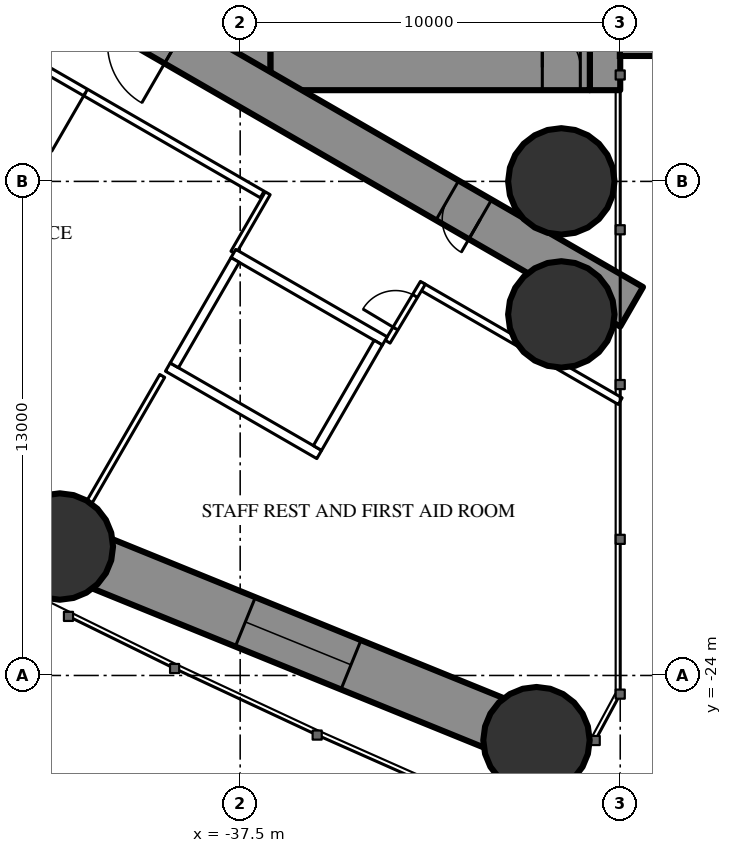
"""IFC4 building model, lengths in metres.
Left out: names, types, materials, properties, quantities, classifications, styles, units other than length and angle.
Written with IfcOpenShell. Run it as: python <this file> out.ifc"""

import sys

from ifc_helpers import new_model, si_unit, direction, frame, frame_2d, origin, origin_2d, place, context, subcontext, project, spatial, rectangle, hollow_circle, extrude, element, fill, save


model = new_model("IFC4")
c1 = context("Model", 3, precision=1e-05, world=origin(), true_north=direction((0.0, 1.0)))
c2 = subcontext(c1, "Body", "Model", "MODEL_VIEW")
j1 = project(units=[si_unit("LENGTHUNIT", "METRE"), si_unit("PLANEANGLEUNIT", "RADIAN")], contexts=[c1])
p1 = place(None, origin())
s1 = spatial("IfcSite", under=j1, at=p1, CompositionType="ELEMENT")
p2 = place(p1, origin())
s2 = spatial("IfcBuilding", under=s1, at=p2, CompositionType="ELEMENT")
p3 = place(p2, frame((0.0, 0.0, 77.5)))
s3 = spatial("IfcBuildingStorey", under=s2, at=p3, CompositionType="ELEMENT", Elevation=77.5)
for number, where, z_axis, x_axis in (
    (1, (-29.703, -25.703, 0.0), (0.0, 0.0, 1.0), (1.0, 0.0, 0.0)),
    (2, (-29.05, -11.0, 0.0), (0.0, 0.0, 1.0), (1.0, 0.0, 0.0)),
    (3, (-29.05, -14.5, 0.0), (0.0, 0.0, 1.0), (1.0, 0.0, 0.0)),
    (4, (-42.245, -20.607, 0.0), (0.0, 0.0, 1.0), (1.0, 0.0, 0.0)),
):
    element("IfcColumn", number, at=place(p3, frame(where, z_axis=z_axis, x_axis=x_axis)), inside=s3, PredefinedType="COLUMN", context=c2, shape_type="SweptSolid", body=[
        extrude(hollow_circle(Radius=1.4, WallThickness=0.12, at=origin_2d()), origin(), (0.0, 0.0, 1.0), 3.5),
    ])
p4 = place(p3, frame((-27.9, 8.6, 0.0), z_axis=(0.0, 0.0, 1.0), x_axis=(0.0, -1.0, 0.0)))
e5 = element("IfcWall", 5, at=p4, inside=s3, PredefinedType="SHEAR", context=c2, shape_type="SweptSolid", body=[
    extrude(rectangle(XDim=17.2, YDim=0.8, at=frame_2d((8.6, 0.0))), origin(), (0.0, 0.0, 1.0), 3.5),
])
p5 = place(p4, frame((2.45, 0.0, 0.6)))
e6 = element("IfcOpeningElement", 6, at=p5, cuts=e5, PredefinedType="OPENING", context=c2, shape_type="SweptSolid", body=[
    extrude(rectangle(XDim=0.6, YDim=2.1, at=frame_2d((0.3, 1.05))), frame((0.0, 0.41, 0.0), z_axis=(0.0, -1.0, 0.0), x_axis=(1.0, 0.0, 0.0)), (0.0, 0.0, 1.0), 0.82),
])
p6 = place(p4, frame((14.15, 0.0, 0.6)))
e7 = element("IfcOpeningElement", 7, at=p6, cuts=e5, PredefinedType="OPENING", context=c2, shape_type="SweptSolid", body=[
    extrude(rectangle(XDim=0.6, YDim=2.1, at=frame_2d((0.3, 1.05))), frame((0.0, 0.41, 0.0), z_axis=(0.0, -1.0, 0.0), x_axis=(1.0, 0.0, 0.0)), (0.0, 0.0, 1.0), 0.82),
])
p7 = place(p3, frame((-37.3, 8.6, 0.0), z_axis=(0.0, 0.0, 1.0), x_axis=(0.0, -1.0, 0.0)))
e8 = element("IfcWall", 8, at=p7, inside=s3, PredefinedType="SHEAR", context=c2, shape_type="SweptSolid", body=[
    extrude(rectangle(XDim=17.2, YDim=1.2, at=frame_2d((8.6, 0.0))), origin(), (0.0, 0.0, 1.0), 3.5),
])
p8 = place(p7, frame((7.7, 0.0, 0.0)))
e9 = element("IfcOpeningElement", 9, at=p8, cuts=e8, PredefinedType="OPENING", context=c2, shape_type="SweptSolid", body=[
    extrude(rectangle(XDim=1.8, YDim=2.2, at=frame_2d((0.9, 1.1))), frame((0.0, 0.61, 0.0), z_axis=(0.0, -1.0, 0.0), x_axis=(1.0, 0.0, 0.0)), (0.0, 0.0, 1.0), 1.22),
])
p9 = place(p3, frame((-28.3, -8.0, 0.0), z_axis=(0.0, 0.0, 1.0), x_axis=(-1.0, 0.0, 0.0)))
e10 = element("IfcWall", 10, at=p9, inside=s3, PredefinedType="SHEAR", context=c2, shape_type="SweptSolid", body=[
    extrude(rectangle(XDim=8.4, YDim=1.2, at=frame_2d((4.2, 0.0))), origin(), (0.0, 0.0, 1.0), 3.5),
])
p10 = place(p9, frame((0.25, 0.0, 0.0)))
e11 = element("IfcOpeningElement", 11, at=p10, cuts=e10, PredefinedType="OPENING", context=c2, shape_type="SweptSolid", body=[
    extrude(rectangle(XDim=1.0, YDim=2.2, at=frame_2d((0.5, 1.1))), frame((0.0, 0.61, 0.0), z_axis=(0.0, -1.0, 0.0), x_axis=(1.0, 0.0, 0.0)), (0.0, 0.0, 1.0), 1.22),
])
p11 = place(p3, frame((-27.2, -14.3, 0.0), z_axis=(0.0, 0.0, 1.0), x_axis=(-0.866024021859, 0.500002393557, 0.0)))
e12 = element("IfcWall", 12, at=p11, inside=s3, PredefinedType="SHEAR", context=c2, shape_type="SweptSolid", body=[
    extrude(rectangle(XDim=27.907, YDim=1.2, at=frame_2d((13.954, 0.0))), origin(), (0.0, 0.0, 1.0), 3.5),
])
p12 = place(p11, frame((4.6, 0.0, 0.0)))
e13 = element("IfcOpeningElement", 13, at=p12, cuts=e12, PredefinedType="OPENING", context=c2, shape_type="SweptSolid", body=[
    extrude(rectangle(XDim=1.0, YDim=2.2, at=frame_2d((0.5, 1.1))), frame((0.0, 0.61, 0.0), z_axis=(0.0, -1.0, 0.0), x_axis=(1.0, 0.0, 0.0)), (0.0, 0.0, 1.0), 1.22),
])
p13 = place(p11, frame((13.845, 0.0, 0.0)))
e14 = element("IfcOpeningElement", 14, at=p13, cuts=e12, PredefinedType="OPENING", context=c2, shape_type="SweptSolid", body=[
    extrude(rectangle(XDim=1.8, YDim=2.2, at=frame_2d((0.9, 1.1))), frame((0.0, 0.61, 0.0), z_axis=(0.0, -1.0, 0.0), x_axis=(1.0, 0.0, 0.0)), (0.0, 0.0, 1.0), 1.22),
])
p14 = place(p3, frame((-53.09, -14.745, 0.0), z_axis=(0.0, 0.0, 1.0), x_axis=(0.879692855603, -0.475542300749, 0.0)))
e15 = element("IfcWall", 15, at=p14, inside=s3, PredefinedType="SHEAR", context=c2, shape_type="SweptSolid", body=[
    extrude(rectangle(XDim=12.328, YDim=1.4, at=frame_2d((6.164, 0.0))), origin(), (0.0, 0.0, 1.0), 3.5),
])
p15 = place(p14, frame((4.664, 0.0, 0.6)))
e16 = element("IfcOpeningElement", 16, at=p15, cuts=e15, PredefinedType="OPENING", context=c2, shape_type="SweptSolid", body=[
    extrude(rectangle(XDim=3.0, YDim=1.2, at=frame_2d((1.5, 0.6))), frame((0.0, 0.71, 0.0), z_axis=(0.0, -1.0, 0.0), x_axis=(1.0, 0.0, 0.0)), (0.0, 0.0, 1.0), 1.42),
])
p16 = place(p3, frame((-42.245, -20.607, 0.0), z_axis=(0.0, 0.0, 1.0), x_axis=(0.926463236197, -0.376385270667, 0.0)))
e17 = element("IfcWall", 17, at=p16, inside=s3, PredefinedType="SHEAR", context=c2, shape_type="SweptSolid", body=[
    extrude(rectangle(XDim=13.537, YDim=1.4, at=frame_2d((6.769, 0.0))), origin(), (0.0, 0.0, 1.0), 3.5),
])
p17 = place(p16, frame((5.269, 0.0, 0.6)))
e18 = element("IfcOpeningElement", 18, at=p17, cuts=e17, PredefinedType="OPENING", context=c2, shape_type="SweptSolid", body=[
    extrude(rectangle(XDim=3.0, YDim=1.2, at=frame_2d((1.5, 0.6))), frame((0.0, 0.71, 0.0), z_axis=(0.0, -1.0, 0.0), x_axis=(1.0, 0.0, 0.0)), (0.0, 0.0, 1.0), 1.42),
])
p18 = place(p3, frame((-39.551, -16.118, 0.0), z_axis=(0.0, 0.0, 1.0), x_axis=(-0.499986503906, -0.866033195618, 0.0)))
e19 = element("IfcWall", 19, at=p18, inside=s3, PredefinedType="PARTITIONING", context=c2, shape_type="SweptSolid", body=[
    extrude(rectangle(XDim=3.815, YDim=0.15, at=frame_2d((1.907, 0.0))), origin(), (0.0, 0.0, 1.0), 3.25),
])
p19 = place(p3, frame((-27.5, -16.782, 0.0), z_axis=(0.0, 0.0, 1.0), x_axis=(-0.866030050624, 0.499991951352, 0.0)))
e20 = element("IfcWall", 20, at=p19, inside=s3, PredefinedType="PARTITIONING", context=c2, shape_type="SweptSolid", body=[
    extrude(rectangle(XDim=6.038, YDim=0.2, at=frame_2d((3.019, 0.0))), origin(), (0.0, 0.0, 1.0), 3.25),
])
p20 = place(p3, frame((-36.92, -11.344, 0.0), z_axis=(0.0, 0.0, 1.0), x_axis=(-0.866028313256, 0.499994960614, 0.0)))
e21 = element("IfcWall", 21, at=p20, inside=s3, PredefinedType="PARTITIONING", context=c2, shape_type="SweptSolid", body=[
    extrude(rectangle(XDim=22.568, YDim=0.2, at=frame_2d((11.284, 0.0))), origin(), (0.0, 0.0, 1.0), 3.25),
])
p21 = place(p20, frame((20.808, 0.0, 0.0)))
e22 = element("IfcOpeningElement", 22, at=p21, cuts=e21, PredefinedType="OPENING", context=c2, shape_type="SweptSolid", body=[
    extrude(rectangle(XDim=1.209, YDim=2.2, at=frame_2d((0.604, 1.1))), frame((0.0, 0.11, 0.0), z_axis=(0.0, -1.0, 0.0), x_axis=(1.0, 0.0, 0.0)), (0.0, 0.0, 1.0), 0.22),
])
p22 = place(p20, frame((15.544, 0.0, 0.0)))
e23 = element("IfcOpeningElement", 23, at=p22, cuts=e21, PredefinedType="OPENING", context=c2, shape_type="SweptSolid", body=[
    extrude(rectangle(XDim=1.8, YDim=2.2, at=frame_2d((0.9, 1.1))), frame((0.0, 0.11, 0.0), z_axis=(0.0, -1.0, 0.0), x_axis=(1.0, 0.0, 0.0)), (0.0, 0.0, 1.0), 0.22),
])
p23 = place(p20, frame((5.365, 0.0, 0.0)))
e24 = element("IfcOpeningElement", 24, at=p23, cuts=e21, PredefinedType="OPENING", context=c2, shape_type="SweptSolid", body=[
    extrude(rectangle(XDim=1.8, YDim=2.2, at=frame_2d((0.9, 1.1))), frame((0.0, 0.11, 0.0), z_axis=(0.0, -1.0, 0.0), x_axis=(1.0, 0.0, 0.0)), (0.0, 0.0, 1.0), 0.22),
])
p24 = place(p3, frame((-36.776, -11.312, 0.0), z_axis=(0.0, 0.0, 1.0), x_axis=(-0.500038651731, -0.866003087047, 0.0)))
e25 = element("IfcWall", 25, at=p24, inside=s3, PredefinedType="PARTITIONING", context=c2, shape_type="SweptSolid", body=[
    extrude(rectangle(XDim=1.804, YDim=0.15, at=frame_2d((0.902, 0.0))), origin(), (0.0, 0.0, 1.0), 3.25),
])
p25 = place(p3, frame((-33.621, -15.218, 0.0), z_axis=(0.0, 0.0, 1.0), x_axis=(0.514336634837, 0.857588377991, 0.0)))
e26 = element("IfcWall", 26, at=p25, inside=s3, PredefinedType="PARTITIONING", context=c2, shape_type="SweptSolid", body=[
    extrude(rectangle(XDim=1.805, YDim=0.15, at=frame_2d((0.903, 0.0))), origin(), (0.0, 0.0, 1.0), 3.25),
])
p26 = place(p25, frame((0.403, 0.0, 0.0)))
e27 = element("IfcOpeningElement", 27, at=p26, cuts=e26, PredefinedType="OPENING", context=c2, shape_type="SweptSolid", body=[
    extrude(rectangle(XDim=1.0, YDim=2.04, at=frame_2d((0.5, 1.02))), frame((0.0, 0.085, 0.0), z_axis=(0.0, -1.0, 0.0), x_axis=(1.0, 0.0, 0.0)), (0.0, 0.0, 1.0), 0.17),
])
p27 = place(p3, frame((-33.696, -15.197, 0.0), z_axis=(0.0, 0.0, 1.0), x_axis=(-0.865976953817, 0.500083908417, 0.0)))
e28 = element("IfcWall", 28, at=p27, inside=s3, PredefinedType="PARTITIONING", context=c2, shape_type="SweptSolid", body=[
    extrude(rectangle(XDim=4.599, YDim=0.25, at=frame_2d((2.3, 0.0))), origin(), (0.0, 0.0, 1.0), 3.25),
])
p28 = place(p3, frame((-35.42, -18.186, 0.0), z_axis=(0.0, 0.0, 1.0), x_axis=(-0.865990227814, 0.50006092162, 0.0)))
e29 = element("IfcWall", 29, at=p28, inside=s3, PredefinedType="PARTITIONING", context=c2, shape_type="SweptSolid", body=[
    extrude(rectangle(XDim=4.6, YDim=0.25, at=frame_2d((2.3, 0.0))), origin(), (0.0, 0.0, 1.0), 3.25),
])
p29 = place(p3, frame((-33.866, -15.243, 0.0), z_axis=(0.0, 0.0, 1.0), x_axis=(-0.499929347863, -0.866066190972, 0.0)))
e30 = element("IfcWall", 30, at=p29, inside=s3, PredefinedType="PARTITIONING", context=c2, shape_type="SweptSolid", body=[
    extrude(rectangle(XDim=3.201, YDim=0.25, at=frame_2d((1.6, 0.0))), origin(), (0.0, 0.0, 1.0), 3.25),
])
p30 = place(p3, frame((-37.633, -13.068, 0.0), z_axis=(0.0, 0.0, 1.0), x_axis=(-0.499872130319, -0.866099216793, 0.0)))
e31 = element("IfcWall", 31, at=p30, inside=s3, PredefinedType="PARTITIONING", context=c2, shape_type="SweptSolid", body=[
    extrude(rectangle(XDim=3.2, YDim=0.25, at=frame_2d((1.6, 0.0))), origin(), (0.0, 0.0, 1.0), 3.25),
])
p31 = place(p17, origin())
e32 = element("IfcWindow", 32, at=p31, inside=s3, PartitioningType="SINGLE_PANEL", PredefinedType="WINDOW", context=c2, shape_type="SweptSolid", body=[
    extrude(rectangle(XDim=3.0, YDim=1.2, at=frame_2d((1.5, 0.6))), frame((0.0, 0.03, 0.0), z_axis=(0.0, -1.0, 0.0), x_axis=(1.0, 0.0, 0.0)), (0.0, 0.0, 1.0), 0.06),
])
fill(e18, e32)
p32 = place(p23, origin())
e33 = element("IfcDoor", 33, at=p32, inside=s3, OperationType="DOUBLE_DOOR_SINGLE_SWING", PredefinedType="DOOR", context=c2, shape_type="SweptSolid", body=[
    extrude(rectangle(XDim=1.8, YDim=2.2, at=frame_2d((0.9, 1.1))), frame((0.0, 0.025, 0.0), z_axis=(0.0, -1.0, 0.0), x_axis=(1.0, 0.0, 0.0)), (0.0, 0.0, 1.0), 0.05),
])
fill(e24, e33)
p33 = place(p26, origin())
e34 = element("IfcDoor", 34, at=p33, inside=s3, OperationType="SINGLE_SWING_LEFT", PredefinedType="DOOR", context=c2, shape_type="SweptSolid", body=[
    extrude(rectangle(XDim=1.0, YDim=2.04, at=frame_2d((0.5, 1.02))), frame((0.0, 0.025, 0.0), z_axis=(0.0, -1.0, 0.0), x_axis=(1.0, 0.0, 0.0)), (0.0, 0.0, 1.0), 0.05),
])
fill(e27, e34)
p34 = place(p12, origin())
e35 = element("IfcDoor", 35, at=p34, inside=s3, OperationType="SINGLE_SWING_LEFT", PredefinedType="DOOR", context=c2, shape_type="SweptSolid", body=[
    extrude(rectangle(XDim=1.0, YDim=2.2, at=frame_2d((0.5, 1.1))), frame((0.0, 0.025, 0.0), z_axis=(0.0, -1.0, 0.0), x_axis=(1.0, 0.0, 0.0)), (0.0, 0.0, 1.0), 0.05),
])
fill(e13, e35)
p35 = place(p10, origin())
e36 = element("IfcDoor", 36, at=p35, inside=s3, OperationType="SINGLE_SWING_RIGHT", PredefinedType="DOOR", context=c2, shape_type="SweptSolid", body=[
    extrude(rectangle(XDim=1.0, YDim=2.2, at=frame_2d((0.5, 1.1))), frame((0.0, 0.025, 0.0), z_axis=(0.0, -1.0, 0.0), x_axis=(1.0, 0.0, 0.0)), (0.0, 0.0, 1.0), 0.05),
])
fill(e11, e36)
save(model, sys.argv[1])
